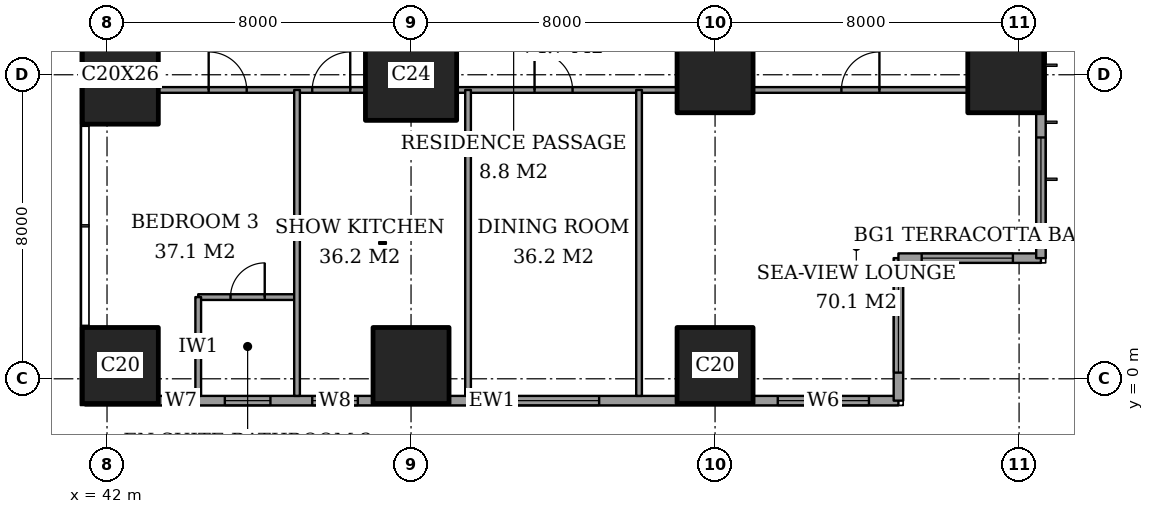
"""IFC4 building model, lengths in metres.
Left out: names, types, materials, properties, quantities, classifications, styles, units other than length and angle.
Written with IfcOpenShell. Run it as: python <this file> out.ifc"""

import sys

from ifc_helpers import new_model, si_unit, direction, frame, frame_2d, origin, origin_2d, place, context, subcontext, project, spatial, rectangle, extrude, element, fill, save


model = new_model("IFC4")
c1 = context("Model", 3, precision=1e-05, world=origin(), true_north=direction((0.0, 1.0)))
c2 = subcontext(c1, "Body", "Model", "MODEL_VIEW")
j1 = project(units=[si_unit("LENGTHUNIT", "METRE"), si_unit("PLANEANGLEUNIT", "RADIAN")], contexts=[c1])
p1 = place(None, origin())
s1 = spatial("IfcSite", under=j1, at=p1, CompositionType="ELEMENT")
p2 = place(p1, origin())
s2 = spatial("IfcBuilding", under=s1, at=p2, CompositionType="ELEMENT")
p3 = place(p2, frame((0.0, 0.0, 33.2)))
s3 = spatial("IfcBuildingStorey", under=s2, at=p3, CompositionType="ELEMENT", Elevation=33.2)
p4 = place(p3, frame((42.35, 0.35, 0.0), z_axis=(0.0, 0.0, 1.0), x_axis=(1.0, 0.0, 0.0)))
e1 = element("IfcColumn", 1, at=p4, inside=s3, PredefinedType="COLUMN", context=c2, shape_type="SweptSolid", body=[
    extrude(rectangle(XDim=2.0, YDim=2.0, at=origin_2d()), origin(), (0.0, 0.0, 1.0), 3.6),
])
p5 = place(p3, frame((42.35, 8.0, 0.0), z_axis=(0.0, 0.0, 1.0), x_axis=(1.0, 0.0, 0.0)))
e2 = element("IfcColumn", 2, at=p5, inside=s3, PredefinedType="COLUMN", context=c2, shape_type="SweptSolid", body=[
    extrude(rectangle(XDim=2.0, YDim=2.6, at=origin_2d()), origin(), (0.0, 0.0, 1.0), 3.6),
])
p6 = place(p3, frame((50.0, 0.35, 0.0), z_axis=(0.0, 0.0, 1.0), x_axis=(1.0, 0.0, 0.0)))
e3 = element("IfcColumn", 3, at=p6, inside=s3, PredefinedType="COLUMN", context=c2, shape_type="SweptSolid", body=[
    extrude(rectangle(XDim=2.0, YDim=2.0, at=origin_2d()), origin(), (0.0, 0.0, 1.0), 3.6),
])
p7 = place(p3, frame((50.0, 8.0, 0.0), z_axis=(0.0, 0.0, 1.0), x_axis=(1.0, 0.0, 0.0)))
e4 = element("IfcColumn", 4, at=p7, inside=s3, PredefinedType="COLUMN", context=c2, shape_type="SweptSolid", body=[
    extrude(rectangle(XDim=2.4, YDim=2.4, at=origin_2d()), origin(), (0.0, 0.0, 1.0), 3.6),
])
for number, where, z_axis, x_axis in (
    (5, (58.0, 0.35, 0.0), (0.0, 0.0, 1.0), (1.0, 0.0, 0.0)),
    (6, (58.0, 8.0, 0.0), (0.0, 0.0, 1.0), (1.0, 0.0, 0.0)),
    (7, (65.65, 8.0, 0.0), (0.0, 0.0, 1.0), (1.0, 0.0, 0.0)),
):
    element("IfcColumn", number, at=place(p3, frame(where, z_axis=z_axis, x_axis=x_axis)), inside=s3, PredefinedType="COLUMN", context=c2, shape_type="SweptSolid", body=[
        extrude(rectangle(XDim=2.0, YDim=2.0, at=origin_2d()), origin(), (0.0, 0.0, 1.0), 3.6),
    ])
p8 = place(p3, frame((41.425, -0.575, 0.0), z_axis=(0.0, 0.0, 1.0), x_axis=(1.0, 0.0, 0.0)))
e8 = element("IfcWall", 8, at=p8, inside=s3, PredefinedType="SOLIDWALL", context=c2, shape_type="SweptSolid", body=[
    extrude(rectangle(XDim=21.4, YDim=0.25, at=frame_2d((10.7, 0.0))), origin(), (0.0, 0.0, 1.0), 3.6),
])
p9 = place(p8, frame((2.225, 0.0, 0.6)))
e9 = element("IfcOpeningElement", 9, at=p9, cuts=e8, PredefinedType="OPENING", context=c2, shape_type="SweptSolid", body=[
    extrude(rectangle(XDim=0.6, YDim=2.0, at=frame_2d((0.3, 1.0))), frame((0.0, 0.135, 0.0), z_axis=(0.0, -1.0, 0.0), x_axis=(1.0, 0.0, 0.0)), (0.0, 0.0, 1.0), 0.27),
])
p10 = place(p8, frame((3.675, 0.0, 0.6)))
e10 = element("IfcOpeningElement", 10, at=p10, cuts=e8, PredefinedType="OPENING", context=c2, shape_type="SweptSolid", body=[
    extrude(rectangle(XDim=1.2, YDim=2.0, at=frame_2d((0.6, 1.0))), frame((0.0, 0.135, 0.0), z_axis=(0.0, -1.0, 0.0), x_axis=(1.0, 0.0, 0.0)), (0.0, 0.0, 1.0), 0.27),
])
p11 = place(p8, frame((5.975, 0.0, 0.6)))
e11 = element("IfcOpeningElement", 11, at=p11, cuts=e8, PredefinedType="OPENING", context=c2, shape_type="SweptSolid", body=[
    extrude(rectangle(XDim=1.2, YDim=2.0, at=frame_2d((0.6, 1.0))), frame((0.0, 0.135, 0.0), z_axis=(0.0, -1.0, 0.0), x_axis=(1.0, 0.0, 0.0)), (0.0, 0.0, 1.0), 0.27),
])
p12 = place(p8, frame((11.125, 0.0, 0.6)))
e12 = element("IfcOpeningElement", 12, at=p12, cuts=e8, PredefinedType="OPENING", context=c2, shape_type="SweptSolid", body=[
    extrude(rectangle(XDim=2.4, YDim=2.0, at=frame_2d((1.2, 1.0))), frame((0.0, 0.135, 0.0), z_axis=(0.0, -1.0, 0.0), x_axis=(1.0, 0.0, 0.0)), (0.0, 0.0, 1.0), 0.27),
])
p13 = place(p8, frame((18.225, 0.0, 0.6)))
e13 = element("IfcOpeningElement", 13, at=p13, cuts=e8, PredefinedType="OPENING", context=c2, shape_type="SweptSolid", body=[
    extrude(rectangle(XDim=2.4, YDim=2.0, at=frame_2d((1.2, 1.0))), frame((0.0, 0.135, 0.0), z_axis=(0.0, -1.0, 0.0), x_axis=(1.0, 0.0, 0.0)), (0.0, 0.0, 1.0), 0.27),
])
p14 = place(p3, frame((62.825, -0.575, 0.0), z_axis=(0.0, 0.0, 1.0), x_axis=(0.0, 1.0, 0.0)))
e14 = element("IfcWall", 14, at=p14, inside=s3, PredefinedType="SOLIDWALL", context=c2, shape_type="SweptSolid", body=[
    extrude(rectangle(XDim=3.75, YDim=0.25, at=frame_2d((1.875, 0.0))), origin(), (0.0, 0.0, 1.0), 3.6),
])
p15 = place(p14, frame((0.738, 0.0, 0.6)))
e15 = element("IfcOpeningElement", 15, at=p15, cuts=e14, PredefinedType="OPENING", context=c2, shape_type="SweptSolid", body=[
    extrude(rectangle(XDim=2.4, YDim=2.0, at=frame_2d((1.2, 1.0))), frame((0.0, 0.135, 0.0), z_axis=(0.0, -1.0, 0.0), x_axis=(1.0, 0.0, 0.0)), (0.0, 0.0, 1.0), 0.27),
])
p16 = place(p3, frame((62.825, 3.175, 0.0), z_axis=(0.0, 0.0, 1.0), x_axis=(1.0, 0.0, 0.0)))
e16 = element("IfcWall", 16, at=p16, inside=s3, PredefinedType="SOLIDWALL", context=c2, shape_type="SweptSolid", body=[
    extrude(rectangle(XDim=3.75, YDim=0.25, at=frame_2d((1.875, 0.0))), origin(), (0.0, 0.0, 1.0), 3.6),
])
p17 = place(p16, frame((0.613, 0.0, 0.6)))
e17 = element("IfcOpeningElement", 17, at=p17, cuts=e16, PredefinedType="OPENING", context=c2, shape_type="SweptSolid", body=[
    extrude(rectangle(XDim=2.4, YDim=2.0, at=frame_2d((1.2, 1.0))), frame((0.0, 0.135, 0.0), z_axis=(0.0, -1.0, 0.0), x_axis=(1.0, 0.0, 0.0)), (0.0, 0.0, 1.0), 0.27),
])
p18 = place(p3, frame((66.575, 3.175, 0.0), z_axis=(0.0, 0.0, 1.0), x_axis=(0.0, 1.0, 0.0)))
e18 = element("IfcWall", 18, at=p18, inside=s3, PredefinedType="SOLIDWALL", context=c2, shape_type="SweptSolid", body=[
    extrude(rectangle(XDim=41.65, YDim=0.25, at=frame_2d((20.825, 0.0))), origin(), (0.0, 0.0, 1.0), 3.6),
])
p19 = place(p18, frame((0.775, 0.0, 0.6)))
e19 = element("IfcOpeningElement", 19, at=p19, cuts=e18, PredefinedType="OPENING", context=c2, shape_type="SweptSolid", body=[
    extrude(rectangle(XDim=2.4, YDim=2.0, at=frame_2d((1.2, 1.0))), frame((0.0, 0.135, 0.0), z_axis=(0.0, -1.0, 0.0), x_axis=(1.0, 0.0, 0.0)), (0.0, 0.0, 1.0), 0.27),
])
p20 = place(p18, frame((6.1, 0.0, 0.6)))
e20 = element("IfcOpeningElement", 20, at=p20, cuts=e18, PredefinedType="OPENING", context=c2, shape_type="SweptSolid", body=[
    extrude(rectangle(XDim=1.2, YDim=2.0, at=frame_2d((0.6, 1.0))), frame((0.0, 0.135, 0.0), z_axis=(0.0, -1.0, 0.0), x_axis=(1.0, 0.0, 0.0)), (0.0, 0.0, 1.0), 0.27),
])
p21 = place(p18, frame((8.275, 0.0, 0.6)))
e21 = element("IfcOpeningElement", 21, at=p21, cuts=e18, PredefinedType="OPENING", context=c2, shape_type="SweptSolid", body=[
    extrude(rectangle(XDim=2.4, YDim=2.0, at=frame_2d((1.2, 1.0))), frame((0.0, 0.135, 0.0), z_axis=(0.0, -1.0, 0.0), x_axis=(1.0, 0.0, 0.0)), (0.0, 0.0, 1.0), 0.27),
])
p22 = place(p18, frame((15.775, 0.0, 0.6)))
e22 = element("IfcOpeningElement", 22, at=p22, cuts=e18, PredefinedType="OPENING", context=c2, shape_type="SweptSolid", body=[
    extrude(rectangle(XDim=2.4, YDim=2.0, at=frame_2d((1.2, 1.0))), frame((0.0, 0.135, 0.0), z_axis=(0.0, -1.0, 0.0), x_axis=(1.0, 0.0, 0.0)), (0.0, 0.0, 1.0), 0.27),
])
p23 = place(p18, frame((23.475, 0.0, 0.6)))
e23 = element("IfcOpeningElement", 23, at=p23, cuts=e18, PredefinedType="OPENING", context=c2, shape_type="SweptSolid", body=[
    extrude(rectangle(XDim=2.4, YDim=2.0, at=frame_2d((1.2, 1.0))), frame((0.0, 0.135, 0.0), z_axis=(0.0, -1.0, 0.0), x_axis=(1.0, 0.0, 0.0)), (0.0, 0.0, 1.0), 0.27),
])
p24 = place(p18, frame((30.975, 0.0, 0.6)))
e24 = element("IfcOpeningElement", 24, at=p24, cuts=e18, PredefinedType="OPENING", context=c2, shape_type="SweptSolid", body=[
    extrude(rectangle(XDim=2.4, YDim=2.0, at=frame_2d((1.2, 1.0))), frame((0.0, 0.135, 0.0), z_axis=(0.0, -1.0, 0.0), x_axis=(1.0, 0.0, 0.0)), (0.0, 0.0, 1.0), 0.27),
])
p25 = place(p18, frame((34.5, 0.0, 0.6)))
e25 = element("IfcOpeningElement", 25, at=p25, cuts=e18, PredefinedType="OPENING", context=c2, shape_type="SweptSolid", body=[
    extrude(rectangle(XDim=1.2, YDim=2.0, at=frame_2d((0.6, 1.0))), frame((0.0, 0.135, 0.0), z_axis=(0.0, -1.0, 0.0), x_axis=(1.0, 0.0, 0.0)), (0.0, 0.0, 1.0), 0.27),
])
p26 = place(p18, frame((38.475, 0.0, 0.6)))
e26 = element("IfcOpeningElement", 26, at=p26, cuts=e18, PredefinedType="OPENING", context=c2, shape_type="SweptSolid", body=[
    extrude(rectangle(XDim=2.4, YDim=2.0, at=frame_2d((1.2, 1.0))), frame((0.0, 0.135, 0.0), z_axis=(0.0, -1.0, 0.0), x_axis=(1.0, 0.0, 0.0)), (0.0, 0.0, 1.0), 0.27),
])
p27 = place(p3, frame((44.4, 2.15, 0.0), z_axis=(0.0, 0.0, 1.0), x_axis=(1.0, 0.0, 0.0)))
e27 = element("IfcWall", 27, at=p27, inside=s3, PredefinedType="PARTITIONING", context=c2, shape_type="SweptSolid", body=[
    extrude(rectangle(XDim=2.6, YDim=0.15, at=frame_2d((1.3, 0.0))), origin(), (0.0, 0.0, 1.0), 3.35),
])
p28 = place(p27, frame((0.85, 0.0, 0.0)))
e28 = element("IfcOpeningElement", 28, at=p28, cuts=e27, PredefinedType="OPENING", context=c2, shape_type="SweptSolid", body=[
    extrude(rectangle(XDim=0.9, YDim=2.1, at=frame_2d((0.45, 1.05))), frame((0.0, 0.085, 0.0), z_axis=(0.0, -1.0, 0.0), x_axis=(1.0, 0.0, 0.0)), (0.0, 0.0, 1.0), 0.17),
])
p29 = place(p3, frame((43.35, 7.6, 0.0), z_axis=(0.0, 0.0, 1.0), x_axis=(1.0, 0.0, 0.0)))
e29 = element("IfcWall", 29, at=p29, inside=s3, PredefinedType="PARTITIONING", context=c2, shape_type="SweptSolid", body=[
    extrude(rectangle(XDim=5.45, YDim=0.15, at=frame_2d((2.725, 0.0))), origin(), (0.0, 0.0, 1.0), 3.35),
])
p30 = place(p29, frame((4.05, 0.0, 0.0)))
e30 = element("IfcOpeningElement", 30, at=p30, cuts=e29, PredefinedType="OPENING", context=c2, shape_type="SweptSolid", body=[
    extrude(rectangle(XDim=1.0, YDim=2.1, at=frame_2d((0.5, 1.05))), frame((0.0, 0.085, 0.0), z_axis=(0.0, -1.0, 0.0), x_axis=(1.0, 0.0, 0.0)), (0.0, 0.0, 1.0), 0.17),
])
p31 = place(p29, frame((1.325, 0.0, 0.0)))
e31 = element("IfcOpeningElement", 31, at=p31, cuts=e29, PredefinedType="OPENING", context=c2, shape_type="SweptSolid", body=[
    extrude(rectangle(XDim=1.0, YDim=2.1, at=frame_2d((0.5, 1.05))), frame((0.0, 0.085, 0.0), z_axis=(0.0, -1.0, 0.0), x_axis=(1.0, 0.0, 0.0)), (0.0, 0.0, 1.0), 0.17),
])
p32 = place(p3, frame((51.2, 7.6, 0.0), z_axis=(0.0, 0.0, 1.0), x_axis=(1.0, 0.0, 0.0)))
e32 = element("IfcWall", 32, at=p32, inside=s3, PredefinedType="PARTITIONING", context=c2, shape_type="SweptSolid", body=[
    extrude(rectangle(XDim=5.8, YDim=0.15, at=frame_2d((2.9, 0.0))), origin(), (0.0, 0.0, 1.0), 3.35),
])
p33 = place(p32, frame((2.05, 0.0, 0.0)))
e33 = element("IfcOpeningElement", 33, at=p33, cuts=e32, PredefinedType="OPENING", context=c2, shape_type="SweptSolid", body=[
    extrude(rectangle(XDim=1.0, YDim=2.1, at=frame_2d((0.5, 1.05))), frame((0.0, 0.085, 0.0), z_axis=(0.0, -1.0, 0.0), x_axis=(1.0, 0.0, 0.0)), (0.0, 0.0, 1.0), 0.17),
])
p34 = place(p3, frame((59.0, 7.6, 0.0), z_axis=(0.0, 0.0, 1.0), x_axis=(1.0, 0.0, 0.0)))
e34 = element("IfcWall", 34, at=p34, inside=s3, PredefinedType="PARTITIONING", context=c2, shape_type="SweptSolid", body=[
    extrude(rectangle(XDim=5.65, YDim=0.15, at=frame_2d((2.825, 0.0))), origin(), (0.0, 0.0, 1.0), 3.35),
])
p35 = place(p34, frame((2.325, 0.0, 0.0)))
e35 = element("IfcOpeningElement", 35, at=p35, cuts=e34, PredefinedType="OPENING", context=c2, shape_type="SweptSolid", body=[
    extrude(rectangle(XDim=1.0, YDim=2.1, at=frame_2d((0.5, 1.05))), frame((0.0, 0.085, 0.0), z_axis=(0.0, -1.0, 0.0), x_axis=(1.0, 0.0, 0.0)), (0.0, 0.0, 1.0), 0.17),
])
p36 = place(p3, frame((44.4, -0.45, 0.0), z_axis=(0.0, 0.0, 1.0), x_axis=(0.0, 1.0, 0.0)))
e36 = element("IfcWall", 36, at=p36, inside=s3, PredefinedType="PARTITIONING", context=c2, shape_type="SweptSolid", body=[
    extrude(rectangle(XDim=2.6, YDim=0.15, at=frame_2d((1.3, 0.0))), origin(), (0.0, 0.0, 1.0), 3.35),
])
for number, where, z_axis, x_axis in (
    (37, (47.0, -0.45, 0.0), (0.0, 0.0, 1.0), (0.0, 1.0, 0.0)),
    (38, (51.5, -0.45, 0.0), (0.0, 0.0, 1.0), (0.0, 1.0, 0.0)),
    (39, (56.0, -0.45, 0.0), (0.0, 0.0, 1.0), (0.0, 1.0, 0.0)),
):
    element("IfcWall", number, at=place(p3, frame(where, z_axis=z_axis, x_axis=x_axis)), inside=s3, PredefinedType="PARTITIONING", context=c2, shape_type="SweptSolid", body=[
        extrude(rectangle(XDim=8.05, YDim=0.15, at=frame_2d((4.025, 0.0))), origin(), (0.0, 0.0, 1.0), 3.35),
    ])
p37 = place(p9, origin())
e40 = element("IfcWindow", 40, at=p37, inside=s3, PartitioningType="SINGLE_PANEL", PredefinedType="WINDOW", context=c2, shape_type="SweptSolid", body=[
    extrude(rectangle(XDim=0.6, YDim=2.0, at=frame_2d((0.3, 1.0))), frame((0.0, 0.03, 0.0), z_axis=(0.0, -1.0, 0.0), x_axis=(1.0, 0.0, 0.0)), (0.0, 0.0, 1.0), 0.06),
])
fill(e9, e40)
p38 = place(p10, origin())
e41 = element("IfcWindow", 41, at=p38, inside=s3, PartitioningType="SINGLE_PANEL", PredefinedType="WINDOW", context=c2, shape_type="SweptSolid", body=[
    extrude(rectangle(XDim=1.2, YDim=2.0, at=frame_2d((0.6, 1.0))), frame((0.0, 0.03, 0.0), z_axis=(0.0, -1.0, 0.0), x_axis=(1.0, 0.0, 0.0)), (0.0, 0.0, 1.0), 0.06),
])
fill(e10, e41)
p39 = place(p11, origin())
e42 = element("IfcWindow", 42, at=p39, inside=s3, PartitioningType="SINGLE_PANEL", PredefinedType="WINDOW", context=c2, shape_type="SweptSolid", body=[
    extrude(rectangle(XDim=1.2, YDim=2.0, at=frame_2d((0.6, 1.0))), frame((0.0, 0.03, 0.0), z_axis=(0.0, -1.0, 0.0), x_axis=(1.0, 0.0, 0.0)), (0.0, 0.0, 1.0), 0.06),
])
fill(e11, e42)
p40 = place(p12, origin())
e43 = element("IfcWindow", 43, at=p40, inside=s3, PartitioningType="SINGLE_PANEL", PredefinedType="WINDOW", context=c2, shape_type="SweptSolid", body=[
    extrude(rectangle(XDim=2.4, YDim=2.0, at=frame_2d((1.2, 1.0))), frame((0.0, 0.03, 0.0), z_axis=(0.0, -1.0, 0.0), x_axis=(1.0, 0.0, 0.0)), (0.0, 0.0, 1.0), 0.06),
])
fill(e12, e43)
p41 = place(p13, origin())
e44 = element("IfcWindow", 44, at=p41, inside=s3, PartitioningType="SINGLE_PANEL", PredefinedType="WINDOW", context=c2, shape_type="SweptSolid", body=[
    extrude(rectangle(XDim=2.4, YDim=2.0, at=frame_2d((1.2, 1.0))), frame((0.0, 0.03, 0.0), z_axis=(0.0, -1.0, 0.0), x_axis=(1.0, 0.0, 0.0)), (0.0, 0.0, 1.0), 0.06),
])
fill(e13, e44)
p42 = place(p15, origin())
e45 = element("IfcWindow", 45, at=p42, inside=s3, PartitioningType="SINGLE_PANEL", PredefinedType="WINDOW", context=c2, shape_type="SweptSolid", body=[
    extrude(rectangle(XDim=2.4, YDim=2.0, at=frame_2d((1.2, 1.0))), frame((0.0, 0.03, 0.0), z_axis=(0.0, -1.0, 0.0), x_axis=(1.0, 0.0, 0.0)), (0.0, 0.0, 1.0), 0.06),
])
fill(e15, e45)
p43 = place(p17, origin())
e46 = element("IfcWindow", 46, at=p43, inside=s3, PartitioningType="SINGLE_PANEL", PredefinedType="WINDOW", context=c2, shape_type="SweptSolid", body=[
    extrude(rectangle(XDim=2.4, YDim=2.0, at=frame_2d((1.2, 1.0))), frame((0.0, 0.03, 0.0), z_axis=(0.0, -1.0, 0.0), x_axis=(1.0, 0.0, 0.0)), (0.0, 0.0, 1.0), 0.06),
])
fill(e17, e46)
p44 = place(p19, origin())
e47 = element("IfcWindow", 47, at=p44, inside=s3, PartitioningType="SINGLE_PANEL", PredefinedType="WINDOW", context=c2, shape_type="SweptSolid", body=[
    extrude(rectangle(XDim=2.4, YDim=2.0, at=frame_2d((1.2, 1.0))), frame((0.0, 0.03, 0.0), z_axis=(0.0, -1.0, 0.0), x_axis=(1.0, 0.0, 0.0)), (0.0, 0.0, 1.0), 0.06),
])
fill(e19, e47)
p45 = place(p35, origin())
e48 = element("IfcDoor", 48, at=p45, inside=s3, OperationType="SINGLE_SWING_LEFT", PredefinedType="DOOR", context=c2, shape_type="SweptSolid", body=[
    extrude(rectangle(XDim=1.0, YDim=2.1, at=frame_2d((0.5, 1.05))), frame((0.0, 0.025, 0.0), z_axis=(0.0, -1.0, 0.0), x_axis=(1.0, 0.0, 0.0)), (0.0, 0.0, 1.0), 0.05),
])
fill(e35, e48)
p46 = place(p33, origin())
e49 = element("IfcDoor", 49, at=p46, inside=s3, OperationType="SINGLE_SWING_RIGHT", PredefinedType="DOOR", context=c2, shape_type="SweptSolid", body=[
    extrude(rectangle(XDim=1.0, YDim=2.1, at=frame_2d((0.5, 1.05))), frame((0.0, 0.025, 0.0), z_axis=(0.0, -1.0, 0.0), x_axis=(1.0, 0.0, 0.0)), (0.0, 0.0, 1.0), 0.05),
])
fill(e33, e49)
p47 = place(p30, origin())
e50 = element("IfcDoor", 50, at=p47, inside=s3, OperationType="SINGLE_SWING_LEFT", PredefinedType="DOOR", context=c2, shape_type="SweptSolid", body=[
    extrude(rectangle(XDim=1.0, YDim=2.1, at=frame_2d((0.5, 1.05))), frame((0.0, 0.025, 0.0), z_axis=(0.0, -1.0, 0.0), x_axis=(1.0, 0.0, 0.0)), (0.0, 0.0, 1.0), 0.05),
])
fill(e30, e50)
p48 = place(p28, origin())
e51 = element("IfcDoor", 51, at=p48, inside=s3, OperationType="SINGLE_SWING_LEFT", PredefinedType="DOOR", context=c2, shape_type="SweptSolid", body=[
    extrude(rectangle(XDim=0.9, YDim=2.1, at=frame_2d((0.45, 1.05))), frame((0.0, 0.025, 0.0), z_axis=(0.0, -1.0, 0.0), x_axis=(1.0, 0.0, 0.0)), (0.0, 0.0, 1.0), 0.05),
])
fill(e28, e51)
p49 = place(p31, origin())
e52 = element("IfcDoor", 52, at=p49, inside=s3, OperationType="SINGLE_SWING_RIGHT", PredefinedType="DOOR", context=c2, shape_type="SweptSolid", body=[
    extrude(rectangle(XDim=1.0, YDim=2.1, at=frame_2d((0.5, 1.05))), frame((0.0, 0.025, 0.0), z_axis=(0.0, -1.0, 0.0), x_axis=(1.0, 0.0, 0.0)), (0.0, 0.0, 1.0), 0.05),
])
fill(e31, e52)
save(model, sys.argv[1])
